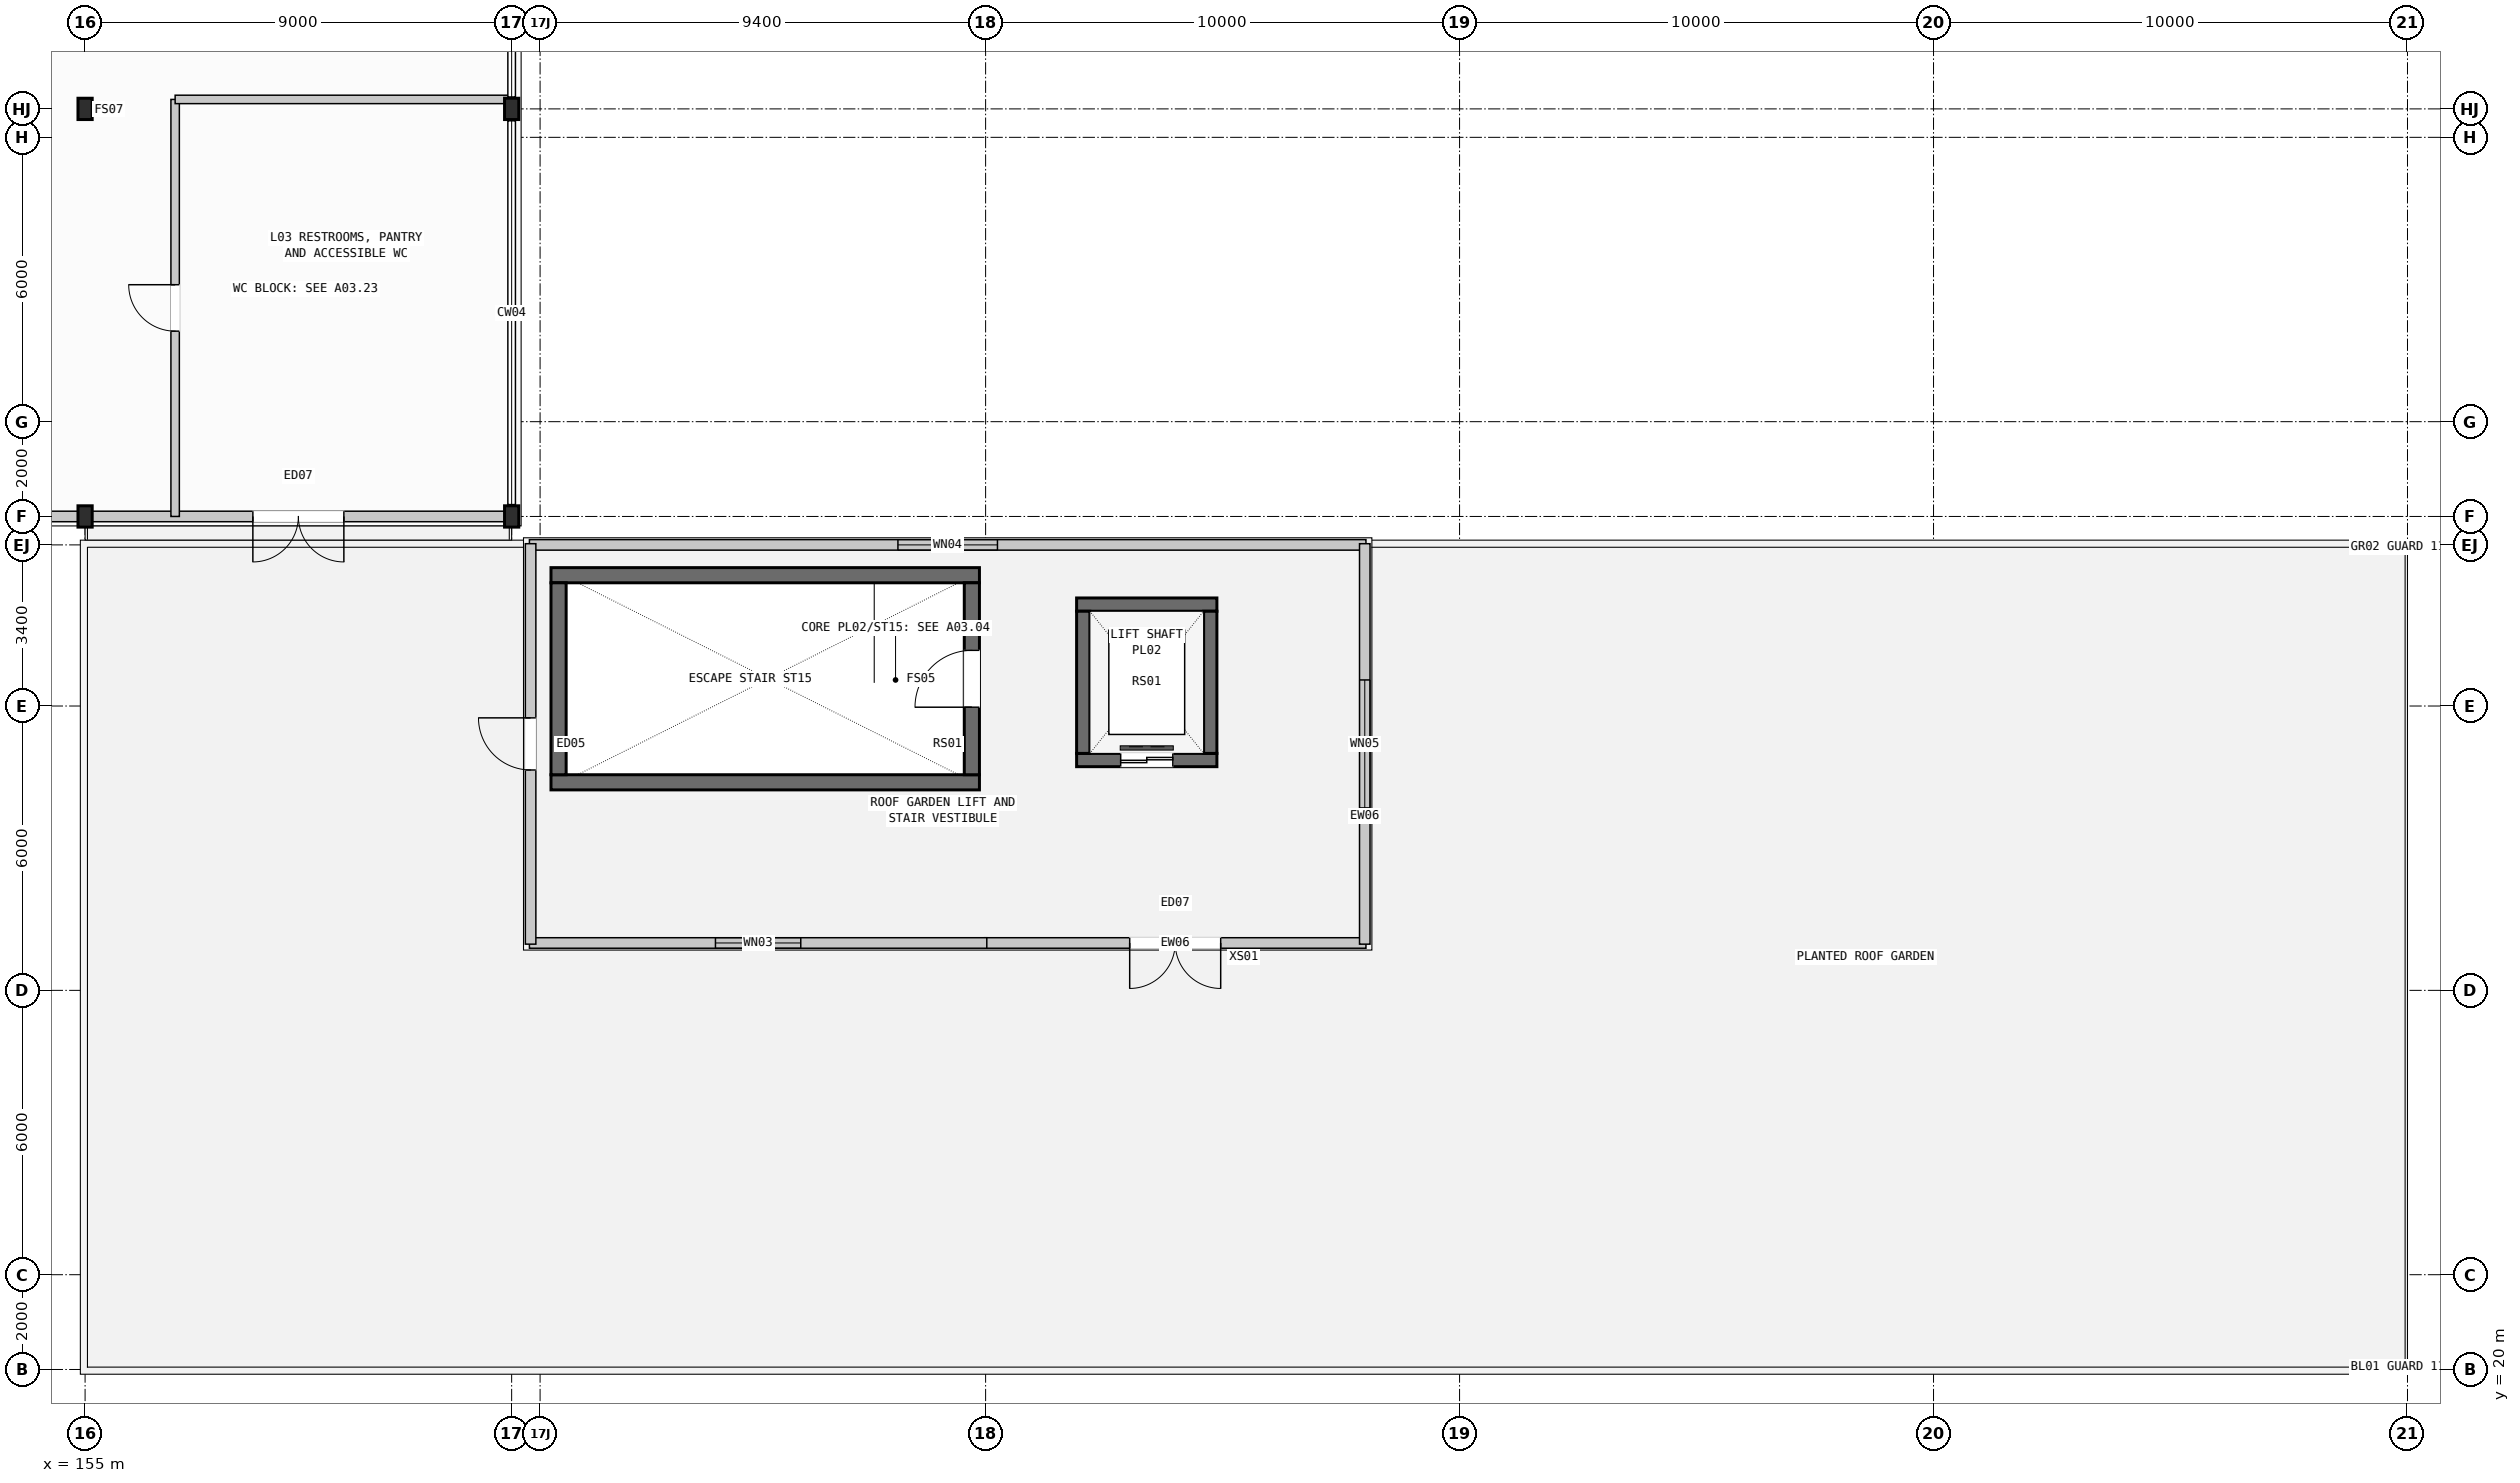
"""IFC4 building model, lengths in metres.
Left out: names, types, materials, properties, quantities, classifications, styles, units other than length and angle.
Written with IfcOpenShell. Run it as: python <this file> out.ifc"""

import sys

from ifc_helpers import new_model, si_unit, direction, frame, frame_2d, origin, origin_2d, place, context, subcontext, project, spatial, rectangle, i_section, extrude, element, fill, save


model = new_model("IFC4")
c1 = context("Model", 3, precision=1e-05, world=origin(), true_north=direction((0.0, 1.0)))
c2 = subcontext(c1, "Body", "Model", "MODEL_VIEW")
j1 = project(units=[si_unit("LENGTHUNIT", "METRE"), si_unit("PLANEANGLEUNIT", "RADIAN")], contexts=[c1])
p1 = place(None, origin())
s1 = spatial("IfcSite", under=j1, at=p1, CompositionType="ELEMENT")
p2 = place(p1, origin())
s2 = spatial("IfcBuilding", under=s1, at=p2, CompositionType="ELEMENT")
p3 = place(p2, frame((0.0, 0.0, 16.8)))
s3 = spatial("IfcBuildingStorey", under=s2, at=p3, CompositionType="ELEMENT", Elevation=16.8)
for number, where, z_axis, x_axis in (
    (1, (155.0, 38.0, 0.0), (0.0, 0.0, 1.0), (1.0, 0.0, 0.0)),
    (2, (155.0, 46.6, 0.0), (0.0, 0.0, 1.0), (1.0, 0.0, 0.0)),
    (3, (164.0, 38.0, 0.0), (0.0, 0.0, 1.0), (1.0, 0.0, 0.0)),
    (4, (164.0, 46.6, 0.0), (0.0, 0.0, 1.0), (1.0, 0.0, 0.0)),
):
    element("IfcColumn", number, at=place(p3, frame(where, z_axis=z_axis, x_axis=x_axis)), inside=s3, PredefinedType="COLUMN", context=c2, shape_type="SweptSolid", body=[
        extrude(i_section(OverallWidth=0.3, OverallDepth=0.45, WebThickness=0.014, FlangeThickness=0.026, FilletRadius=0.027, at=origin_2d()), origin(), (0.0, 0.0, 1.0), 4.8),
    ])
for number, where, z_axis, x_axis in (
    (5, (164.83, 32.39, 0.0), (0.0, 0.0, 1.0), (1.0, 0.0, 0.0)),
    (6, (164.83, 36.76, 0.0), (0.0, 0.0, 1.0), (1.0, 0.0, 0.0)),
):
    element("IfcWall", number, at=place(p3, frame(where, z_axis=z_axis, x_axis=x_axis)), inside=s3, PredefinedType="SHEAR", context=c2, shape_type="SweptSolid", body=[
        extrude(rectangle(XDim=9.04, YDim=0.32, at=frame_2d((4.52, 0.0))), origin(), (0.0, 0.0, 1.0), 4.2),
    ])
p4 = place(p3, frame((164.99, 32.55, 0.0), z_axis=(0.0, 0.0, 1.0), x_axis=(0.0, 1.0, 0.0)))
e7 = element("IfcWall", 7, at=p4, inside=s3, PredefinedType="SHEAR", context=c2, shape_type="SweptSolid", body=[
    extrude(rectangle(XDim=4.05, YDim=0.32, at=frame_2d((2.025, 0.0))), origin(), (0.0, 0.0, 1.0), 4.2),
])
p5 = place(p3, frame((173.71, 32.55, 0.0), z_axis=(0.0, 0.0, 1.0), x_axis=(0.0, 1.0, 0.0)))
e8 = element("IfcWall", 8, at=p5, inside=s3, PredefinedType="SHEAR", context=c2, shape_type="SweptSolid", body=[
    extrude(rectangle(XDim=4.05, YDim=0.32, at=frame_2d((2.025, 0.0))), origin(), (0.0, 0.0, 1.0), 4.2),
])
p6 = place(p5, frame((1.425, 0.0, 0.0)))
e9 = element("IfcOpeningElement", 9, at=p6, cuts=e8, PredefinedType="OPENING", context=c2, shape_type="SweptSolid", body=[
    extrude(rectangle(XDim=1.2, YDim=2.2, at=frame_2d((0.6, 1.1))), frame((0.0, 0.17, 0.0), z_axis=(0.0, -1.0, 0.0), x_axis=(1.0, 0.0, 0.0)), (0.0, 0.0, 1.0), 0.34),
])
p7 = place(p3, frame((175.92, 32.86, 0.0), z_axis=(0.0, 0.0, 1.0), x_axis=(1.0, 0.0, 0.0)))
e10 = element("IfcWall", 10, at=p7, inside=s3, PredefinedType="SHEAR", context=c2, shape_type="SweptSolid", body=[
    extrude(rectangle(XDim=2.96, YDim=0.28, at=frame_2d((1.48, 0.0))), origin(), (0.0, 0.0, 1.0), 4.2),
])
p8 = place(p7, frame((0.93, 0.0, 0.0)))
e11 = element("IfcOpeningElement", 11, at=p8, cuts=e10, PredefinedType="OPENING", context=c2, shape_type="SweptSolid", body=[
    extrude(rectangle(XDim=1.1, YDim=2.15, at=frame_2d((0.55, 1.075))), frame((0.0, 0.15, 0.0), z_axis=(0.0, -1.0, 0.0), x_axis=(1.0, 0.0, 0.0)), (0.0, 0.0, 1.0), 0.3),
])
p9 = place(p3, frame((175.92, 36.14, 0.0), z_axis=(0.0, 0.0, 1.0), x_axis=(1.0, 0.0, 0.0)))
e12 = element("IfcWall", 12, at=p9, inside=s3, PredefinedType="SHEAR", context=c2, shape_type="SweptSolid", body=[
    extrude(rectangle(XDim=2.96, YDim=0.28, at=frame_2d((1.48, 0.0))), origin(), (0.0, 0.0, 1.0), 4.2),
])
for number, where, z_axis, x_axis in (
    (13, (176.06, 33.0, 0.0), (0.0, 0.0, 1.0), (0.0, 1.0, 0.0)),
    (14, (178.74, 33.0, 0.0), (0.0, 0.0, 1.0), (0.0, 1.0, 0.0)),
):
    element("IfcWall", number, at=place(p3, frame(where, z_axis=z_axis, x_axis=x_axis)), inside=s3, PredefinedType="SHEAR", context=c2, shape_type="SweptSolid", body=[
        extrude(rectangle(XDim=3.0, YDim=0.28, at=frame_2d((1.5, 0.0))), origin(), (0.0, 0.0, 1.0), 4.2),
    ])
p10 = place(p3, frame((146.746, 38.0, 0.0), z_axis=(0.0, 0.0, 1.0), x_axis=(1.0, 0.0, 0.0)))
e15 = element("IfcWall", 15, at=p10, inside=s3, PredefinedType="STANDARD", context=c2, shape_type="SweptSolid", body=[
    extrude(rectangle(XDim=8.108, YDim=0.222, at=frame_2d((4.054, 0.0))), origin(), (0.0, 0.0, 1.0), 3.965),
])
p11 = place(p3, frame((155.146, 38.0, 0.0), z_axis=(0.0, 0.0, 1.0), x_axis=(1.0, 0.0, 0.0)))
e16 = element("IfcWall", 16, at=p11, inside=s3, PredefinedType="STANDARD", context=c2, shape_type="SweptSolid", body=[
    extrude(rectangle(XDim=8.708, YDim=0.222, at=frame_2d((4.354, 0.0))), origin(), (0.0, 0.0, 1.0), 3.965),
])
p12 = place(p11, frame((3.394, 0.0, 0.0)))
e17 = element("IfcOpeningElement", 17, at=p12, cuts=e16, PredefinedType="OPENING", context=c2, shape_type="SweptSolid", body=[
    extrude(rectangle(XDim=1.92, YDim=2.24, at=frame_2d((0.96, 1.12))), frame((0.0, 0.121, 0.0), z_axis=(0.0, -1.0, 0.0), x_axis=(1.0, 0.0, 0.0)), (0.0, 0.0, 1.0), 0.242),
])
p13 = place(p3, frame((173.975, 29.0, 0.0), z_axis=(0.0, 0.0, 1.0), x_axis=(1.0, 0.0, 0.0)))
e18 = element("IfcWall", 18, at=p13, inside=s3, PredefinedType="STANDARD", context=c2, shape_type="SweptSolid", body=[
    extrude(rectangle(XDim=8.05, YDim=0.222, at=frame_2d((4.025, 0.0))), origin(), (0.0, 0.0, 1.0), 4.0),
])
p14 = place(p13, frame((3.065, 0.0, 0.0)))
e19 = element("IfcOpeningElement", 19, at=p14, cuts=e18, PredefinedType="OPENING", context=c2, shape_type="SweptSolid", body=[
    extrude(rectangle(XDim=1.92, YDim=2.24, at=frame_2d((0.96, 1.12))), frame((0.0, 0.121, 0.0), z_axis=(0.0, -1.0, 0.0), x_axis=(1.0, 0.0, 0.0)), (0.0, 0.0, 1.0), 0.242),
])
p15 = place(p3, frame((164.375, 29.0, 0.0), z_axis=(0.0, 0.0, 1.0), x_axis=(1.0, 0.0, 0.0)))
e20 = element("IfcWall", 20, at=p15, inside=s3, PredefinedType="STANDARD", context=c2, shape_type="SweptSolid", body=[
    extrude(rectangle(XDim=9.65, YDim=0.222, at=frame_2d((4.825, 0.0))), origin(), (0.0, 0.0, 1.0), 4.0),
])
p16 = place(p15, frame((3.925, 0.0, 1.0)))
e21 = element("IfcOpeningElement", 21, at=p16, cuts=e20, PredefinedType="OPENING", context=c2, shape_type="SweptSolid", body=[
    extrude(rectangle(XDim=1.8, YDim=2.1, at=frame_2d((0.9, 1.05))), frame((0.0, 0.121, 0.0), z_axis=(0.0, -1.0, 0.0), x_axis=(1.0, 0.0, 0.0)), (0.0, 0.0, 1.0), 0.242),
])
p17 = place(p3, frame((164.375, 37.4, 0.0), z_axis=(0.0, 0.0, 1.0), x_axis=(1.0, 0.0, 0.0)))
e22 = element("IfcWall", 22, at=p17, inside=s3, PredefinedType="STANDARD", context=c2, shape_type="SweptSolid", body=[
    extrude(rectangle(XDim=17.65, YDim=0.222, at=frame_2d((8.825, 0.0))), origin(), (0.0, 0.0, 1.0), 4.0),
])
p18 = place(p17, frame((7.775, 0.0, 1.0)))
e23 = element("IfcOpeningElement", 23, at=p18, cuts=e22, PredefinedType="OPENING", context=c2, shape_type="SweptSolid", body=[
    extrude(rectangle(XDim=2.1, YDim=1.95, at=frame_2d((1.05, 0.975))), frame((0.0, 0.121, 0.0), z_axis=(0.0, -1.0, 0.0), x_axis=(1.0, 0.0, 0.0)), (0.0, 0.0, 1.0), 0.242),
])
p19 = place(p3, frame((164.4, 28.975, 0.0), z_axis=(0.0, 0.0, 1.0), x_axis=(0.0, 1.0, 0.0)))
e24 = element("IfcWall", 24, at=p19, inside=s3, PredefinedType="STANDARD", context=c2, shape_type="SweptSolid", body=[
    extrude(rectangle(XDim=8.45, YDim=0.222, at=frame_2d((4.225, 0.0))), origin(), (0.0, 0.0, 1.0), 4.0),
])
p20 = place(p19, frame((3.675, 0.0, 0.0)))
e25 = element("IfcOpeningElement", 25, at=p20, cuts=e24, PredefinedType="OPENING", context=c2, shape_type="SweptSolid", body=[
    extrude(rectangle(XDim=1.1, YDim=2.2, at=frame_2d((0.55, 1.1))), frame((0.0, 0.121, 0.0), z_axis=(0.0, -1.0, 0.0), x_axis=(1.0, 0.0, 0.0)), (0.0, 0.0, 1.0), 0.242),
])
p21 = place(p3, frame((182.0, 28.975, 0.0), z_axis=(0.0, 0.0, 1.0), x_axis=(0.0, 1.0, 0.0)))
e26 = element("IfcWall", 26, at=p21, inside=s3, PredefinedType="STANDARD", context=c2, shape_type="SweptSolid", body=[
    extrude(rectangle(XDim=8.45, YDim=0.222, at=frame_2d((4.225, 0.0))), origin(), (0.0, 0.0, 1.0), 4.0),
])
p22 = place(p21, frame((2.875, 0.0, 1.0)))
e27 = element("IfcOpeningElement", 27, at=p22, cuts=e26, PredefinedType="OPENING", context=c2, shape_type="SweptSolid", body=[
    extrude(rectangle(XDim=2.7, YDim=1.95, at=frame_2d((1.35, 0.975))), frame((0.0, 0.121, 0.0), z_axis=(0.0, -1.0, 0.0), x_axis=(1.0, 0.0, 0.0)), (0.0, 0.0, 1.0), 0.242),
])
p23 = place(p3, frame((156.9, 38.0, 0.0), z_axis=(0.0, 0.0, 1.0), x_axis=(0.0, 1.0, 0.0)))
e28 = element("IfcWall", 28, at=p23, inside=s3, PredefinedType="PARTITIONING", context=c2, shape_type="SweptSolid", body=[
    extrude(rectangle(XDim=8.8, YDim=0.178, at=frame_2d((4.4, 0.0))), origin(), (0.0, 0.0, 1.0), 3.965),
])
p24 = place(p23, frame((3.91, 0.0, 0.0)))
e29 = element("IfcOpeningElement", 29, at=p24, cuts=e28, PredefinedType="OPENING", context=c2, shape_type="SweptSolid", body=[
    extrude(rectangle(XDim=0.98, YDim=2.14, at=frame_2d((0.49, 1.07))), frame((0.0, 0.099, 0.0), z_axis=(0.0, -1.0, 0.0), x_axis=(1.0, 0.0, 0.0)), (0.0, 0.0, 1.0), 0.198),
])
p25 = place(p3, frame((156.9, 46.8, 0.0), z_axis=(0.0, 0.0, 1.0), x_axis=(1.0, 0.0, 0.0)))
e30 = element("IfcWall", 30, at=p25, inside=s3, PredefinedType="PARTITIONING", context=c2, shape_type="SweptSolid", body=[
    extrude(rectangle(XDim=7.1, YDim=0.178, at=frame_2d((3.55, 0.0))), origin(), (0.0, 0.0, 1.0), 3.965),
])
p26 = place(p12, frame((1.92, 0.0, 0.0), z_axis=(0.0, 0.0, 1.0), x_axis=(-1.0, 0.0, 0.0)))
e31 = element("IfcDoor", 31, at=p26, inside=s3, OperationType="DOUBLE_DOOR_SINGLE_SWING", PredefinedType="DOOR", context=c2, shape_type="SweptSolid", body=[
    extrude(rectangle(XDim=1.92, YDim=2.24, at=frame_2d((0.96, 1.12))), frame((0.0, 0.025, 0.0), z_axis=(0.0, -1.0, 0.0), x_axis=(1.0, 0.0, 0.0)), (0.0, 0.0, 1.0), 0.05),
])
fill(e17, e31)
p27 = place(p14, frame((1.92, 0.0, 0.0), z_axis=(0.0, 0.0, 1.0), x_axis=(-1.0, 0.0, 0.0)))
e32 = element("IfcDoor", 32, at=p27, inside=s3, OperationType="DOUBLE_DOOR_SINGLE_SWING", PredefinedType="DOOR", context=c2, shape_type="SweptSolid", body=[
    extrude(rectangle(XDim=1.92, YDim=2.24, at=frame_2d((0.96, 1.12))), frame((0.0, 0.025, 0.0), z_axis=(0.0, -1.0, 0.0), x_axis=(1.0, 0.0, 0.0)), (0.0, 0.0, 1.0), 0.05),
])
fill(e19, e32)
p28 = place(p16, origin())
e33 = element("IfcWindow", 33, at=p28, inside=s3, PartitioningType="SINGLE_PANEL", PredefinedType="WINDOW", context=c2, shape_type="SweptSolid", body=[
    extrude(rectangle(XDim=1.8, YDim=2.1, at=frame_2d((0.9, 1.05))), frame((0.0, 0.03, 0.0), z_axis=(0.0, -1.0, 0.0), x_axis=(1.0, 0.0, 0.0)), (0.0, 0.0, 1.0), 0.06),
])
fill(e21, e33)
p29 = place(p18, origin())
e34 = element("IfcWindow", 34, at=p29, inside=s3, PartitioningType="SINGLE_PANEL", PredefinedType="WINDOW", context=c2, shape_type="SweptSolid", body=[
    extrude(rectangle(XDim=2.1, YDim=1.95, at=frame_2d((1.05, 0.975))), frame((0.0, 0.03, 0.0), z_axis=(0.0, -1.0, 0.0), x_axis=(1.0, 0.0, 0.0)), (0.0, 0.0, 1.0), 0.06),
])
fill(e23, e34)
p30 = place(p20, origin())
e35 = element("IfcDoor", 35, at=p30, inside=s3, OperationType="SINGLE_SWING_RIGHT", PredefinedType="DOOR", context=c2, shape_type="SweptSolid", body=[
    extrude(rectangle(XDim=1.1, YDim=2.2, at=frame_2d((0.55, 1.1))), frame((0.0, 0.025, 0.0), z_axis=(0.0, -1.0, 0.0), x_axis=(1.0, 0.0, 0.0)), (0.0, 0.0, 1.0), 0.05),
])
fill(e25, e35)
p31 = place(p22, origin())
e36 = element("IfcWindow", 36, at=p31, inside=s3, PartitioningType="SINGLE_PANEL", PredefinedType="WINDOW", context=c2, shape_type="SweptSolid", body=[
    extrude(rectangle(XDim=2.7, YDim=1.95, at=frame_2d((1.35, 0.975))), frame((0.0, 0.03, 0.0), z_axis=(0.0, -1.0, 0.0), x_axis=(1.0, 0.0, 0.0)), (0.0, 0.0, 1.0), 0.06),
])
fill(e27, e36)
p32 = place(p6, origin())
e37 = element("IfcDoor", 37, at=p32, inside=s3, OperationType="SINGLE_SWING_LEFT", PredefinedType="DOOR", context=c2, shape_type="SweptSolid", body=[
    extrude(rectangle(XDim=1.2, YDim=2.2, at=frame_2d((0.6, 1.1))), frame((0.0, 0.025, 0.0), z_axis=(0.0, -1.0, 0.0), x_axis=(1.0, 0.0, 0.0)), (0.0, 0.0, 1.0), 0.05),
])
fill(e9, e37)
p33 = place(p8, origin())
e38 = element("IfcDoor", 38, at=p33, inside=s3, OperationType="DOUBLE_DOOR_SLIDING", PredefinedType="DOOR", context=c2, shape_type="SweptSolid", body=[
    extrude(rectangle(XDim=1.1, YDim=2.15, at=frame_2d((0.55, 1.075))), frame((0.0, 0.025, 0.0), z_axis=(0.0, -1.0, 0.0), x_axis=(1.0, 0.0, 0.0)), (0.0, 0.0, 1.0), 0.05),
])
fill(e11, e38)
p34 = place(p24, origin())
e39 = element("IfcDoor", 39, at=p34, inside=s3, OperationType="SINGLE_SWING_RIGHT", PredefinedType="DOOR", context=c2, shape_type="SweptSolid", body=[
    extrude(rectangle(XDim=0.98, YDim=2.14, at=frame_2d((0.49, 1.07))), frame((0.0, 0.025, 0.0), z_axis=(0.0, -1.0, 0.0), x_axis=(1.0, 0.0, 0.0)), (0.0, 0.0, 1.0), 0.05),
])
fill(e29, e39)
save(model, sys.argv[1])
